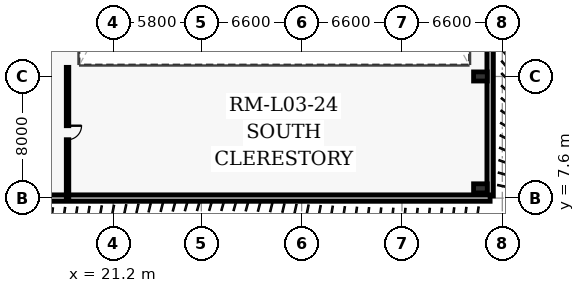
"""IFC4 building model, lengths in metres.
Left out: names, types, materials, properties, quantities, classifications, styles, units other than length and angle.
Written with IfcOpenShell. Run it as: python <this file> out.ifc"""

import sys

from ifc_helpers import new_model, si_unit, direction, frame, frame_2d, origin, origin_2d, place, context, subcontext, project, spatial, rectangle, extrude, element, fill, save


model = new_model("IFC4")
c1 = context("Model", 3, precision=1e-05, world=origin(), true_north=direction((0.0, 1.0)))
c2 = subcontext(c1, "Body", "Model", "MODEL_VIEW")
j1 = project(units=[si_unit("LENGTHUNIT", "METRE"), si_unit("PLANEANGLEUNIT", "RADIAN")], contexts=[c1])
p1 = place(None, origin())
s1 = spatial("IfcSite", under=j1, at=p1, CompositionType="ELEMENT")
p2 = place(p1, origin())
s2 = spatial("IfcBuilding", under=s1, at=p2, CompositionType="ELEMENT")
p3 = place(p2, frame((0.0, 0.0, 15.6)))
s3 = spatial("IfcBuildingStorey", under=s2, at=p3, CompositionType="ELEMENT", Elevation=15.6)
for number, where, z_axis, x_axis in (
    (1, (45.36, 8.24, 0.0), (0.0, 0.0, 1.0), (1.0, 0.0, 0.0)),
    (2, (45.36, 15.6, 0.0), (0.0, 0.0, 1.0), (1.0, 0.0, 0.0)),
):
    element("IfcColumn", number, at=place(p3, frame(where, z_axis=z_axis, x_axis=x_axis)), inside=s3, PredefinedType="COLUMN", context=c2, shape_type="SweptSolid", body=[
        extrude(rectangle(XDim=0.6, YDim=0.9, at=origin_2d()), origin(), (0.0, 0.0, 1.0), 4.8),
    ])
p4 = place(p3, frame((46.0, 63.46, 0.0), z_axis=(0.0, 0.0, 1.0), x_axis=(0.0, -1.0, 0.0)))
e3 = element("IfcWall", 3, at=p4, inside=s3, PredefinedType="SOLIDWALL", context=c2, shape_type="SweptSolid", body=[
    extrude(rectangle(XDim=55.72, YDim=0.425, at=frame_2d((27.86, 0.0))), origin(), (0.0, 0.0, 1.0), 4.555),
])
p5 = place(p3, frame((46.0, 7.6, 0.0), z_axis=(0.0, 0.0, 1.0), x_axis=(-1.0, 0.0, 0.0)))
e4 = element("IfcWall", 4, at=p5, inside=s3, PredefinedType="SOLIDWALL", context=c2, shape_type="SweptSolid", body=[
    extrude(rectangle(XDim=38.0, YDim=0.425, at=frame_2d((19.0, 0.0))), origin(), (0.0, 0.0, 1.0), 4.162),
])
p6 = place(p3, frame((18.2, 16.2, 0.0), z_axis=(0.0, 0.0, 1.0), x_axis=(0.0, -1.0, 0.0)))
e5 = element("IfcWall", 5, at=p6, inside=s3, PredefinedType="PARTITIONING", context=c2, shape_type="SweptSolid", body=[
    extrude(rectangle(XDim=8.6, YDim=0.165, at=frame_2d((4.3, 0.0))), origin(), (0.0, 0.0, 1.0), 4.555),
])
p7 = place(p6, frame((3.84, 0.0, 0.0)))
e6 = element("IfcOpeningElement", 6, at=p7, cuts=e5, PredefinedType="OPENING", context=c2, shape_type="SweptSolid", body=[
    extrude(rectangle(XDim=0.92, YDim=2.1, at=frame_2d((0.46, 1.05))), frame((0.0, 0.093, 0.0), z_axis=(0.0, -1.0, 0.0), x_axis=(1.0, 0.0, 0.0)), (0.0, 0.0, 1.0), 0.185),
])
p8 = place(p7, origin())
e7 = element("IfcDoor", 7, at=p8, inside=s3, OperationType="SINGLE_SWING_LEFT", PredefinedType="DOOR", context=c2, shape_type="SweptSolid", body=[
    extrude(rectangle(XDim=0.92, YDim=2.1, at=frame_2d((0.46, 1.05))), frame((0.0, 0.025, 0.0), z_axis=(0.0, -1.0, 0.0), x_axis=(1.0, 0.0, 0.0)), (0.0, 0.0, 1.0), 0.05),
])
fill(e6, e7)
save(model, sys.argv[1])
